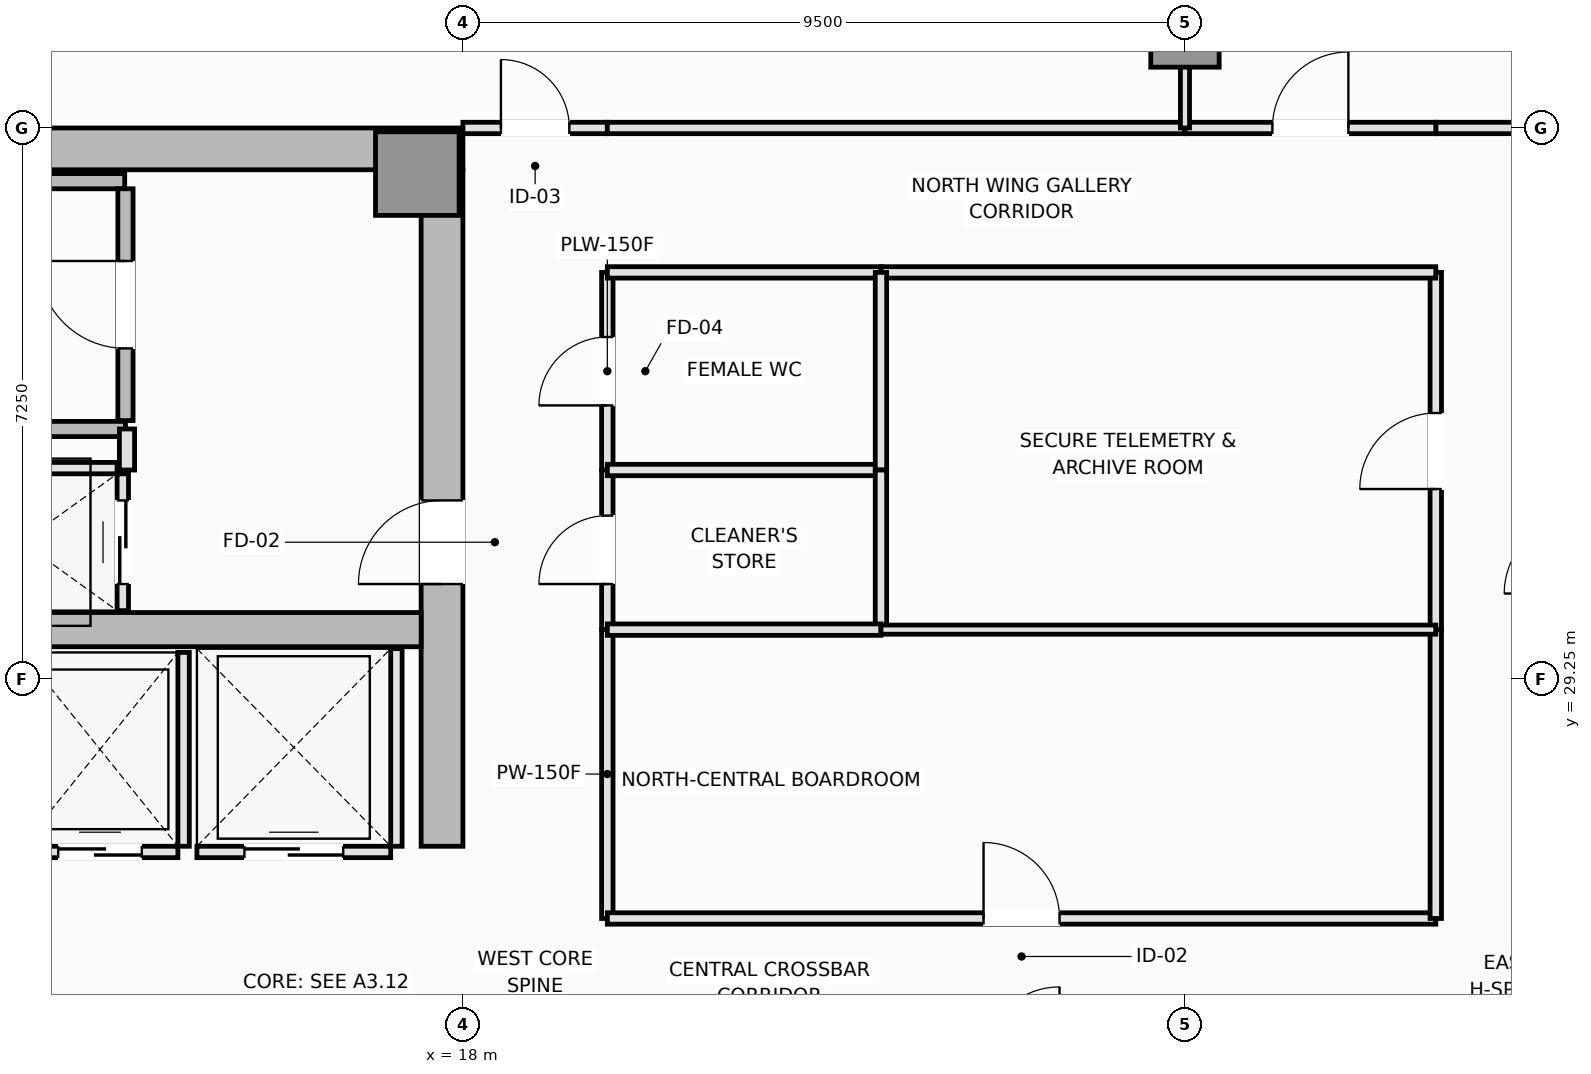
"""IFC4 building model, lengths in metres.
Left out: names, types, materials, properties, quantities, classifications, styles, units other than length and angle.
Written with IfcOpenShell. Run it as: python <this file> out.ifc"""

import sys

from ifc_helpers import new_model, si_unit, direction, frame, frame_2d, origin, origin_2d, place, context, subcontext, project, spatial, rectangle, extrude, element, fill, save


model = new_model("IFC4")
c1 = context("Model", 3, precision=1e-05, world=origin(), true_north=direction((0.0, 1.0)))
c2 = subcontext(c1, "Body", "Model", "MODEL_VIEW")
j1 = project(units=[si_unit("LENGTHUNIT", "METRE"), si_unit("PLANEANGLEUNIT", "RADIAN")], contexts=[c1])
p1 = place(None, origin())
s1 = spatial("IfcSite", under=j1, at=p1, CompositionType="ELEMENT")
p2 = place(p1, origin())
s2 = spatial("IfcBuilding", under=s1, at=p2, CompositionType="ELEMENT")
p3 = place(p2, frame((0.0, 0.0, 188.05)))
s3 = spatial("IfcBuildingStorey", under=s2, at=p3, CompositionType="ELEMENT", Elevation=188.05)
p4 = place(p3, frame((4.5, 36.225, 0.0), z_axis=(0.0, 0.0, 1.0), x_axis=(1.0, 0.0, 0.0)))
e1 = element("IfcWall", 1, at=p4, inside=s3, PredefinedType="SHEAR", context=c2, shape_type="SweptSolid", body=[
    extrude(rectangle(XDim=13.5, YDim=0.55, at=frame_2d((6.75, 0.0))), origin(), (0.0, 0.0, 1.0), 3.55),
])
p5 = place(p3, frame((17.725, 27.05, 0.0), z_axis=(0.0, 0.0, 1.0), x_axis=(0.0, 1.0, 0.0)))
e2 = element("IfcWall", 2, at=p5, inside=s3, PredefinedType="SHEAR", context=c2, shape_type="SweptSolid", body=[
    extrude(rectangle(XDim=8.9, YDim=0.55, at=frame_2d((4.45, 0.0))), origin(), (0.0, 0.0, 1.0), 3.55),
])
p6 = place(p5, frame((3.45, 0.0, 0.0)))
e3 = element("IfcOpeningElement", 3, at=p6, cuts=e2, PredefinedType="OPENING", context=c2, shape_type="SweptSolid", body=[
    extrude(rectangle(XDim=1.1, YDim=2.15, at=frame_2d((0.55, 1.075))), frame((0.0, 0.285, 0.0), z_axis=(0.0, -1.0, 0.0), x_axis=(1.0, 0.0, 0.0)), (0.0, 0.0, 1.0), 0.57),
])
p7 = place(p3, frame((5.05, 29.9, 0.0), z_axis=(0.0, 0.0, 1.0), x_axis=(1.0, 0.0, 0.0)))
e4 = element("IfcWall", 4, at=p7, inside=s3, PredefinedType="SHEAR", context=c2, shape_type="SweptSolid", body=[
    extrude(rectangle(XDim=12.4, YDim=0.45, at=frame_2d((6.2, 0.0))), origin(), (0.0, 0.0, 1.0), 3.55),
])
p8 = place(p3, frame((17.4, 35.9, 0.0), z_axis=(0.0, 0.0, 1.0), x_axis=(1.0, 0.0, 0.0)))
e5 = element("IfcColumn", 5, at=p8, inside=s3, PredefinedType="PILASTER", context=c2, shape_type="SweptSolid", body=[
    extrude(rectangle(XDim=1.1, YDim=1.1, at=origin_2d()), origin(), (0.0, 0.0, 1.0), 3.55),
])
p9 = place(p3, frame((27.5, 37.75, 0.0), z_axis=(0.0, 0.0, 1.0), x_axis=(1.0, 0.0, 0.0)))
e6 = element("IfcColumn", 6, at=p9, inside=s3, PredefinedType="COLUMN", context=c2, shape_type="SweptSolid", body=[
    extrude(rectangle(XDim=0.9, YDim=0.9, at=origin_2d()), origin(), (0.0, 0.0, 1.0), 3.55),
])
p10 = place(p3, frame((5.8, 35.8, 0.0), z_axis=(0.0, 0.0, 1.0), x_axis=(1.0, 0.0, 0.0)))
e7 = element("IfcWall", 7, at=p10, inside=s3, PredefinedType="SOLIDWALL", context=c2, shape_type="SweptSolid", body=[
    extrude(rectangle(XDim=7.75, YDim=0.2, at=frame_2d((3.875, 0.0))), origin(), (0.0, 0.0, 1.0), 3.55),
])
p11 = place(p3, frame((5.9, 32.54, 0.0), z_axis=(0.0, 0.0, 1.0), x_axis=(1.0, 0.0, 0.0)))
e8 = element("IfcWall", 8, at=p11, inside=s3, PredefinedType="SOLIDWALL", context=c2, shape_type="SweptSolid", body=[
    extrude(rectangle(XDim=7.66, YDim=0.2, at=frame_2d((3.83, 0.0))), origin(), (0.0, 0.0, 1.0), 3.55),
])
p12 = place(p3, frame((13.56, 32.65, 0.0), z_axis=(0.0, 0.0, 1.0), x_axis=(0.0, 1.0, 0.0)))
e9 = element("IfcWall", 9, at=p12, inside=s3, PredefinedType="SOLIDWALL", context=c2, shape_type="SweptSolid", body=[
    extrude(rectangle(XDim=3.05, YDim=0.2, at=frame_2d((1.525, 0.0))), origin(), (0.0, 0.0, 1.0), 3.55),
])
p13 = place(p12, frame((0.95, 0.0, 0.0)))
e10 = element("IfcOpeningElement", 10, at=p13, cuts=e9, PredefinedType="OPENING", context=c2, shape_type="SweptSolid", body=[
    extrude(rectangle(XDim=1.15, YDim=2.15, at=frame_2d((0.575, 1.075))), frame((0.0, 0.11, 0.0), z_axis=(0.0, -1.0, 0.0), x_axis=(1.0, 0.0, 0.0)), (0.0, 0.0, 1.0), 0.22),
])
p14 = place(p3, frame((12.2, 26.975, 0.0), z_axis=(0.0, 0.0, 1.0), x_axis=(1.0, 0.0, 0.0)))
e11 = element("IfcWall", 11, at=p14, inside=s3, PredefinedType="PARTITIONING", context=c2, shape_type="SweptSolid", body=[
    extrude(rectangle(XDim=2.05, YDim=0.15, at=frame_2d((1.025, 0.0))), origin(), (0.0, 0.0, 1.0), 3.37),
])
p15 = place(p14, frame((0.475, 0.0, 0.0)))
e12 = element("IfcOpeningElement", 12, at=p15, cuts=e11, PredefinedType="OPENING", context=c2, shape_type="SweptSolid", body=[
    extrude(rectangle(XDim=1.1, YDim=2.2, at=frame_2d((0.55, 1.1))), frame((0.0, 0.085, 0.0), z_axis=(0.0, -1.0, 0.0), x_axis=(1.0, 0.0, 0.0)), (0.0, 0.0, 1.0), 0.17),
])
p16 = place(p3, frame((14.325, 27.05, 0.0), z_axis=(0.0, 0.0, 1.0), x_axis=(0.0, 1.0, 0.0)))
e13 = element("IfcWall", 13, at=p16, inside=s3, PredefinedType="PARTITIONING", context=c2, shape_type="SweptSolid", body=[
    extrude(rectangle(XDim=2.55, YDim=0.15, at=frame_2d((1.275, 0.0))), origin(), (0.0, 0.0, 1.0), 3.37),
])
p17 = place(p3, frame((14.5, 26.975, 0.0), z_axis=(0.0, 0.0, 1.0), x_axis=(1.0, 0.0, 0.0)))
e14 = element("IfcWall", 14, at=p17, inside=s3, PredefinedType="PARTITIONING", context=c2, shape_type="SweptSolid", body=[
    extrude(rectangle(XDim=2.55, YDim=0.15, at=frame_2d((1.275, 0.0))), origin(), (0.0, 0.0, 1.0), 3.37),
])
p18 = place(p17, frame((0.625, 0.0, 0.0)))
e15 = element("IfcOpeningElement", 15, at=p18, cuts=e14, PredefinedType="OPENING", context=c2, shape_type="SweptSolid", body=[
    extrude(rectangle(XDim=1.3, YDim=2.2, at=frame_2d((0.65, 1.1))), frame((0.0, 0.085, 0.0), z_axis=(0.0, -1.0, 0.0), x_axis=(1.0, 0.0, 0.0)), (0.0, 0.0, 1.0), 0.17),
])
p19 = place(p3, frame((17.125, 27.05, 0.0), z_axis=(0.0, 0.0, 1.0), x_axis=(0.0, 1.0, 0.0)))
e16 = element("IfcWall", 16, at=p19, inside=s3, PredefinedType="PARTITIONING", context=c2, shape_type="SweptSolid", body=[
    extrude(rectangle(XDim=2.6, YDim=0.15, at=frame_2d((1.3, 0.0))), origin(), (0.0, 0.0, 1.0), 3.37),
])
p20 = place(p3, frame((10.95, 32.025, 0.0), z_axis=(0.0, 0.0, 1.0), x_axis=(1.0, 0.0, 0.0)))
e17 = element("IfcWall", 17, at=p20, inside=s3, PredefinedType="PARTITIONING", context=c2, shape_type="SweptSolid", body=[
    extrude(rectangle(XDim=2.5, YDim=0.15, at=frame_2d((1.25, 0.0))), origin(), (0.0, 0.0, 1.0), 3.37),
])
p21 = place(p3, frame((13.525, 30.15, 0.0), z_axis=(0.0, 0.0, 1.0), x_axis=(0.0, 1.0, 0.0)))
e18 = element("IfcWall", 18, at=p21, inside=s3, PredefinedType="PARTITIONING", context=c2, shape_type="SweptSolid", body=[
    extrude(rectangle(XDim=1.8, YDim=0.15, at=frame_2d((0.9, 0.0))), origin(), (0.0, 0.0, 1.0), 3.37),
])
p22 = place(p21, frame((0.35, 0.0, 0.0)))
e19 = element("IfcOpeningElement", 19, at=p22, cuts=e18, PredefinedType="OPENING", context=c2, shape_type="SweptSolid", body=[
    extrude(rectangle(XDim=1.1, YDim=2.2, at=frame_2d((0.55, 1.1))), frame((0.0, 0.085, 0.0), z_axis=(0.0, -1.0, 0.0), x_axis=(1.0, 0.0, 0.0)), (0.0, 0.0, 1.0), 0.17),
])
p23 = place(p3, frame((13.58, 32.0, 0.0), z_axis=(0.0, 0.0, 1.0), x_axis=(0.0, 1.0, 0.0)))
e20 = element("IfcWall", 20, at=p23, inside=s3, PredefinedType="PARTITIONING", context=c2, shape_type="SweptSolid", body=[
    extrude(rectangle(XDim=0.54, YDim=0.2, at=frame_2d((0.27, 0.0))), origin(), (0.0, 0.0, 1.0), 3.37),
])
p24 = place(p3, frame((19.9, 32.0, 0.0), z_axis=(0.0, 0.0, 1.0), x_axis=(0.0, 1.0, 0.0)))
e21 = element("IfcWall", 21, at=p24, inside=s3, PredefinedType="PLUMBINGWALL", context=c2, shape_type="SweptSolid", body=[
    extrude(rectangle(XDim=2.6, YDim=0.15, at=frame_2d((1.3, 0.0))), origin(), (0.0, 0.0, 1.0), 3.37),
])
p25 = place(p24, frame((0.85, 0.0, 0.0)))
e22 = element("IfcOpeningElement", 22, at=p25, cuts=e21, PredefinedType="OPENING", context=c2, shape_type="SweptSolid", body=[
    extrude(rectangle(XDim=0.9, YDim=2.1, at=frame_2d((0.45, 1.05))), frame((0.0, 0.085, 0.0), z_axis=(0.0, -1.0, 0.0), x_axis=(1.0, 0.0, 0.0)), (0.0, 0.0, 1.0), 0.17),
])
p26 = place(p3, frame((19.9, 29.9, 0.0), z_axis=(0.0, 0.0, 1.0), x_axis=(0.0, 1.0, 0.0)))
e23 = element("IfcWall", 23, at=p26, inside=s3, PredefinedType="PLUMBINGWALL", context=c2, shape_type="SweptSolid", body=[
    extrude(rectangle(XDim=2.1, YDim=0.15, at=frame_2d((1.05, 0.0))), origin(), (0.0, 0.0, 1.0), 3.37),
])
p27 = place(p26, frame((0.6, 0.0, 0.0)))
e24 = element("IfcOpeningElement", 24, at=p27, cuts=e23, PredefinedType="OPENING", context=c2, shape_type="SweptSolid", body=[
    extrude(rectangle(XDim=0.9, YDim=2.1, at=frame_2d((0.45, 1.05))), frame((0.0, 0.085, 0.0), z_axis=(0.0, -1.0, 0.0), x_axis=(1.0, 0.0, 0.0)), (0.0, 0.0, 1.0), 0.17),
])
p28 = place(p3, frame((19.9, 26.1, 0.0), z_axis=(0.0, 0.0, 1.0), x_axis=(0.0, 1.0, 0.0)))
e25 = element("IfcWall", 25, at=p28, inside=s3, PredefinedType="PARTITIONING", context=c2, shape_type="SweptSolid", body=[
    extrude(rectangle(XDim=3.8, YDim=0.15, at=frame_2d((1.9, 0.0))), origin(), (0.0, 0.0, 1.0), 3.37),
])
p29 = place(p3, frame((18.0, 36.5, 0.0), z_axis=(0.0, 0.0, 1.0), x_axis=(1.0, 0.0, 0.0)))
e26 = element("IfcWall", 26, at=p29, inside=s3, PredefinedType="PARTITIONING", context=c2, shape_type="SweptSolid", body=[
    extrude(rectangle(XDim=1.9, YDim=0.15, at=frame_2d((0.95, 0.0))), origin(), (0.0, 0.0, 1.0), 3.37),
])
p30 = place(p29, frame((0.5, 0.0, 0.0)))
e27 = element("IfcOpeningElement", 27, at=p30, cuts=e26, PredefinedType="OPENING", context=c2, shape_type="SweptSolid", body=[
    extrude(rectangle(XDim=0.9, YDim=2.1, at=frame_2d((0.45, 1.05))), frame((0.0, 0.085, 0.0), z_axis=(0.0, -1.0, 0.0), x_axis=(1.0, 0.0, 0.0)), (0.0, 0.0, 1.0), 0.17),
])
p31 = place(p3, frame((19.9, 26.1, 0.0), z_axis=(0.0, 0.0, 1.0), x_axis=(1.0, 0.0, 0.0)))
e28 = element("IfcWall", 28, at=p31, inside=s3, PredefinedType="PARTITIONING", context=c2, shape_type="SweptSolid", body=[
    extrude(rectangle(XDim=10.9, YDim=0.15, at=frame_2d((5.45, 0.0))), origin(), (0.0, 0.0, 1.0), 3.37),
])
p32 = place(p31, frame((4.95, 0.0, 0.0)))
e29 = element("IfcOpeningElement", 29, at=p32, cuts=e28, PredefinedType="OPENING", context=c2, shape_type="SweptSolid", body=[
    extrude(rectangle(XDim=1.0, YDim=2.15, at=frame_2d((0.5, 1.075))), frame((0.0, 0.085, 0.0), z_axis=(0.0, -1.0, 0.0), x_axis=(1.0, 0.0, 0.0)), (0.0, 0.0, 1.0), 0.17),
])
p33 = place(p3, frame((30.8, 29.9, 0.0), z_axis=(0.0, 0.0, 1.0), x_axis=(0.0, 1.0, 0.0)))
e30 = element("IfcWall", 30, at=p33, inside=s3, PredefinedType="PARTITIONING", context=c2, shape_type="SweptSolid", body=[
    extrude(rectangle(XDim=4.7, YDim=0.15, at=frame_2d((2.35, 0.0))), origin(), (0.0, 0.0, 1.0), 3.37),
])
p34 = place(p33, frame((1.85, 0.0, 0.0)))
e31 = element("IfcOpeningElement", 31, at=p34, cuts=e30, PredefinedType="OPENING", context=c2, shape_type="SweptSolid", body=[
    extrude(rectangle(XDim=1.0, YDim=2.15, at=frame_2d((0.5, 1.075))), frame((0.0, 0.085, 0.0), z_axis=(0.0, -1.0, 0.0), x_axis=(1.0, 0.0, 0.0)), (0.0, 0.0, 1.0), 0.17),
])
p35 = place(p3, frame((30.8, 26.1, 0.0), z_axis=(0.0, 0.0, 1.0), x_axis=(0.0, 1.0, 0.0)))
e32 = element("IfcWall", 32, at=p35, inside=s3, PredefinedType="PARTITIONING", context=c2, shape_type="SweptSolid", body=[
    extrude(rectangle(XDim=3.8, YDim=0.15, at=frame_2d((1.9, 0.0))), origin(), (0.0, 0.0, 1.0), 3.37),
])
p36 = place(p3, frame((30.8, 36.5, 0.0), z_axis=(0.0, 0.0, 1.0), x_axis=(1.0, 0.0, 0.0)))
e33 = element("IfcWall", 33, at=p36, inside=s3, PredefinedType="PARTITIONING", context=c2, shape_type="SweptSolid", body=[
    extrude(rectangle(XDim=1.9, YDim=0.15, at=frame_2d((0.95, 0.0))), origin(), (0.0, 0.0, 1.0), 3.37),
])
p37 = place(p3, frame((19.9, 34.6, 0.0), z_axis=(0.0, 0.0, 1.0), x_axis=(1.0, 0.0, 0.0)))
e34 = element("IfcWall", 34, at=p37, inside=s3, PredefinedType="PLUMBINGWALL", context=c2, shape_type="SweptSolid", body=[
    extrude(rectangle(XDim=3.6, YDim=0.15, at=frame_2d((1.8, 0.0))), origin(), (0.0, 0.0, 1.0), 3.37),
])
p38 = place(p3, frame((23.5, 34.6, 0.0), z_axis=(0.0, 0.0, 1.0), x_axis=(1.0, 0.0, 0.0)))
e35 = element("IfcWall", 35, at=p38, inside=s3, PredefinedType="PARTITIONING", context=c2, shape_type="SweptSolid", body=[
    extrude(rectangle(XDim=7.3, YDim=0.15, at=frame_2d((3.65, 0.0))), origin(), (0.0, 0.0, 1.0), 3.37),
])
p39 = place(p3, frame((19.9, 36.5, 0.0), z_axis=(0.0, 0.0, 1.0), x_axis=(1.0, 0.0, 0.0)))
e36 = element("IfcWall", 36, at=p39, inside=s3, PredefinedType="PARTITIONING", context=c2, shape_type="SweptSolid", body=[
    extrude(rectangle(XDim=7.6, YDim=0.15, at=frame_2d((3.8, 0.0))), origin(), (0.0, 0.0, 1.0), 3.37),
])
p40 = place(p3, frame((27.5, 36.5, 0.0), z_axis=(0.0, 0.0, 1.0), x_axis=(1.0, 0.0, 0.0)))
e37 = element("IfcWall", 37, at=p40, inside=s3, PredefinedType="PARTITIONING", context=c2, shape_type="SweptSolid", body=[
    extrude(rectangle(XDim=3.3, YDim=0.15, at=frame_2d((1.65, 0.0))), origin(), (0.0, 0.0, 1.0), 3.37),
])
p41 = place(p40, frame((1.15, 0.0, 0.0)))
e38 = element("IfcOpeningElement", 38, at=p41, cuts=e37, PredefinedType="OPENING", context=c2, shape_type="SweptSolid", body=[
    extrude(rectangle(XDim=1.0, YDim=2.15, at=frame_2d((0.5, 1.075))), frame((0.0, 0.085, 0.0), z_axis=(0.0, -1.0, 0.0), x_axis=(1.0, 0.0, 0.0)), (0.0, 0.0, 1.0), 0.17),
])
p42 = place(p3, frame((19.9, 32.0, 0.0), z_axis=(0.0, 0.0, 1.0), x_axis=(1.0, 0.0, 0.0)))
e39 = element("IfcWall", 39, at=p42, inside=s3, PredefinedType="PLUMBINGWALL", context=c2, shape_type="SweptSolid", body=[
    extrude(rectangle(XDim=3.6, YDim=0.15, at=frame_2d((1.8, 0.0))), origin(), (0.0, 0.0, 1.0), 2.87),
])
p43 = place(p3, frame((23.5, 32.0, 0.0), z_axis=(0.0, 0.0, 1.0), x_axis=(0.0, 1.0, 0.0)))
e40 = element("IfcWall", 40, at=p43, inside=s3, PredefinedType="PLUMBINGWALL", context=c2, shape_type="SweptSolid", body=[
    extrude(rectangle(XDim=2.6, YDim=0.15, at=frame_2d((1.3, 0.0))), origin(), (0.0, 0.0, 1.0), 3.37),
])
p44 = place(p3, frame((23.5, 29.9, 0.0), z_axis=(0.0, 0.0, 1.0), x_axis=(0.0, 1.0, 0.0)))
e41 = element("IfcWall", 41, at=p44, inside=s3, PredefinedType="PLUMBINGWALL", context=c2, shape_type="SweptSolid", body=[
    extrude(rectangle(XDim=2.1, YDim=0.15, at=frame_2d((1.05, 0.0))), origin(), (0.0, 0.0, 1.0), 3.37),
])
p45 = place(p3, frame((19.9, 29.9, 0.0), z_axis=(0.0, 0.0, 1.0), x_axis=(1.0, 0.0, 0.0)))
e42 = element("IfcWall", 42, at=p45, inside=s3, PredefinedType="PLUMBINGWALL", context=c2, shape_type="SweptSolid", body=[
    extrude(rectangle(XDim=3.6, YDim=0.15, at=frame_2d((1.8, 0.0))), origin(), (0.0, 0.0, 1.0), 3.37),
])
p46 = place(p3, frame((23.5, 29.9, 0.0), z_axis=(0.0, 0.0, 1.0), x_axis=(1.0, 0.0, 0.0)))
e43 = element("IfcWall", 43, at=p46, inside=s3, PredefinedType="PARTITIONING", context=c2, shape_type="SweptSolid", body=[
    extrude(rectangle(XDim=7.3, YDim=0.12, at=frame_2d((3.65, 0.0))), origin(), (0.0, 0.0, 1.0), 3.37),
])
p47 = place(p3, frame((27.5, 36.5, 0.0), z_axis=(0.0, 0.0, 1.0), x_axis=(0.0, 1.0, 0.0)))
e44 = element("IfcWall", 44, at=p47, inside=s3, PredefinedType="PARTITIONING", context=c2, shape_type="SweptSolid", body=[
    extrude(rectangle(XDim=8.99, YDim=0.12, at=frame_2d((4.495, 0.0))), origin(), (0.0, 0.0, 1.0), 2.92),
])
p48 = place(p13, origin())
e45 = element("IfcDoor", 45, at=p48, inside=s3, OperationType="SINGLE_SWING_RIGHT", PredefinedType="DOOR", context=c2, shape_type="SweptSolid", body=[
    extrude(rectangle(XDim=1.15, YDim=2.15, at=frame_2d((0.575, 1.075))), frame((0.0, 0.025, 0.0), z_axis=(0.0, -1.0, 0.0), x_axis=(1.0, 0.0, 0.0)), (0.0, 0.0, 1.0), 0.05),
])
fill(e10, e45)
p49 = place(p15, origin())
e46 = element("IfcDoor", 46, at=p49, inside=s3, OperationType="DOUBLE_DOOR_SLIDING", PredefinedType="DOOR", context=c2, shape_type="SweptSolid", body=[
    extrude(rectangle(XDim=1.1, YDim=2.2, at=frame_2d((0.55, 1.1))), frame((0.0, 0.025, 0.0), z_axis=(0.0, -1.0, 0.0), x_axis=(1.0, 0.0, 0.0)), (0.0, 0.0, 1.0), 0.05),
])
fill(e12, e46)
p50 = place(p18, origin())
e47 = element("IfcDoor", 47, at=p50, inside=s3, OperationType="DOUBLE_DOOR_SLIDING", PredefinedType="DOOR", context=c2, shape_type="SweptSolid", body=[
    extrude(rectangle(XDim=1.3, YDim=2.2, at=frame_2d((0.65, 1.1))), frame((0.0, 0.025, 0.0), z_axis=(0.0, -1.0, 0.0), x_axis=(1.0, 0.0, 0.0)), (0.0, 0.0, 1.0), 0.05),
])
fill(e15, e47)
p51 = place(p22, origin())
e48 = element("IfcDoor", 48, at=p51, inside=s3, OperationType="DOUBLE_DOOR_SLIDING", PredefinedType="DOOR", context=c2, shape_type="SweptSolid", body=[
    extrude(rectangle(XDim=1.1, YDim=2.2, at=frame_2d((0.55, 1.1))), frame((0.0, 0.025, 0.0), z_axis=(0.0, -1.0, 0.0), x_axis=(1.0, 0.0, 0.0)), (0.0, 0.0, 1.0), 0.05),
])
fill(e19, e48)
p52 = place(p6, origin())
e49 = element("IfcDoor", 49, at=p52, inside=s3, OperationType="SINGLE_SWING_LEFT", PredefinedType="DOOR", context=c2, shape_type="SweptSolid", body=[
    extrude(rectangle(XDim=1.1, YDim=2.15, at=frame_2d((0.55, 1.075))), frame((0.0, 0.025, 0.0), z_axis=(0.0, -1.0, 0.0), x_axis=(1.0, 0.0, 0.0)), (0.0, 0.0, 1.0), 0.05),
])
fill(e3, e49)
p53 = place(p25, origin())
e50 = element("IfcDoor", 50, at=p53, inside=s3, OperationType="SINGLE_SWING_LEFT", PredefinedType="DOOR", context=c2, shape_type="SweptSolid", body=[
    extrude(rectangle(XDim=0.9, YDim=2.1, at=frame_2d((0.45, 1.05))), frame((0.0, 0.025, 0.0), z_axis=(0.0, -1.0, 0.0), x_axis=(1.0, 0.0, 0.0)), (0.0, 0.0, 1.0), 0.05),
])
fill(e22, e50)
p54 = place(p27, origin())
e51 = element("IfcDoor", 51, at=p54, inside=s3, OperationType="SINGLE_SWING_LEFT", PredefinedType="DOOR", context=c2, shape_type="SweptSolid", body=[
    extrude(rectangle(XDim=0.9, YDim=2.1, at=frame_2d((0.45, 1.05))), frame((0.0, 0.025, 0.0), z_axis=(0.0, -1.0, 0.0), x_axis=(1.0, 0.0, 0.0)), (0.0, 0.0, 1.0), 0.05),
])
fill(e24, e51)
p55 = place(p30, origin())
e52 = element("IfcDoor", 52, at=p55, inside=s3, OperationType="SINGLE_SWING_LEFT", PredefinedType="DOOR", context=c2, shape_type="SweptSolid", body=[
    extrude(rectangle(XDim=0.9, YDim=2.1, at=frame_2d((0.45, 1.05))), frame((0.0, 0.025, 0.0), z_axis=(0.0, -1.0, 0.0), x_axis=(1.0, 0.0, 0.0)), (0.0, 0.0, 1.0), 0.05),
])
fill(e27, e52)
p56 = place(p32, origin())
e53 = element("IfcDoor", 53, at=p56, inside=s3, OperationType="SINGLE_SWING_LEFT", PredefinedType="DOOR", context=c2, shape_type="SweptSolid", body=[
    extrude(rectangle(XDim=1.0, YDim=2.15, at=frame_2d((0.5, 1.075))), frame((0.0, 0.025, 0.0), z_axis=(0.0, -1.0, 0.0), x_axis=(1.0, 0.0, 0.0)), (0.0, 0.0, 1.0), 0.05),
])
fill(e29, e53)
p57 = place(p34, origin())
e54 = element("IfcDoor", 54, at=p57, inside=s3, OperationType="SINGLE_SWING_LEFT", PredefinedType="DOOR", context=c2, shape_type="SweptSolid", body=[
    extrude(rectangle(XDim=1.0, YDim=2.15, at=frame_2d((0.5, 1.075))), frame((0.0, 0.025, 0.0), z_axis=(0.0, -1.0, 0.0), x_axis=(1.0, 0.0, 0.0)), (0.0, 0.0, 1.0), 0.05),
])
fill(e31, e54)
p58 = place(p41, origin())
e55 = element("IfcDoor", 55, at=p58, inside=s3, OperationType="SINGLE_SWING_RIGHT", PredefinedType="DOOR", context=c2, shape_type="SweptSolid", body=[
    extrude(rectangle(XDim=1.0, YDim=2.15, at=frame_2d((0.5, 1.075))), frame((0.0, 0.025, 0.0), z_axis=(0.0, -1.0, 0.0), x_axis=(1.0, 0.0, 0.0)), (0.0, 0.0, 1.0), 0.05),
])
fill(e38, e55)
save(model, sys.argv[1])
